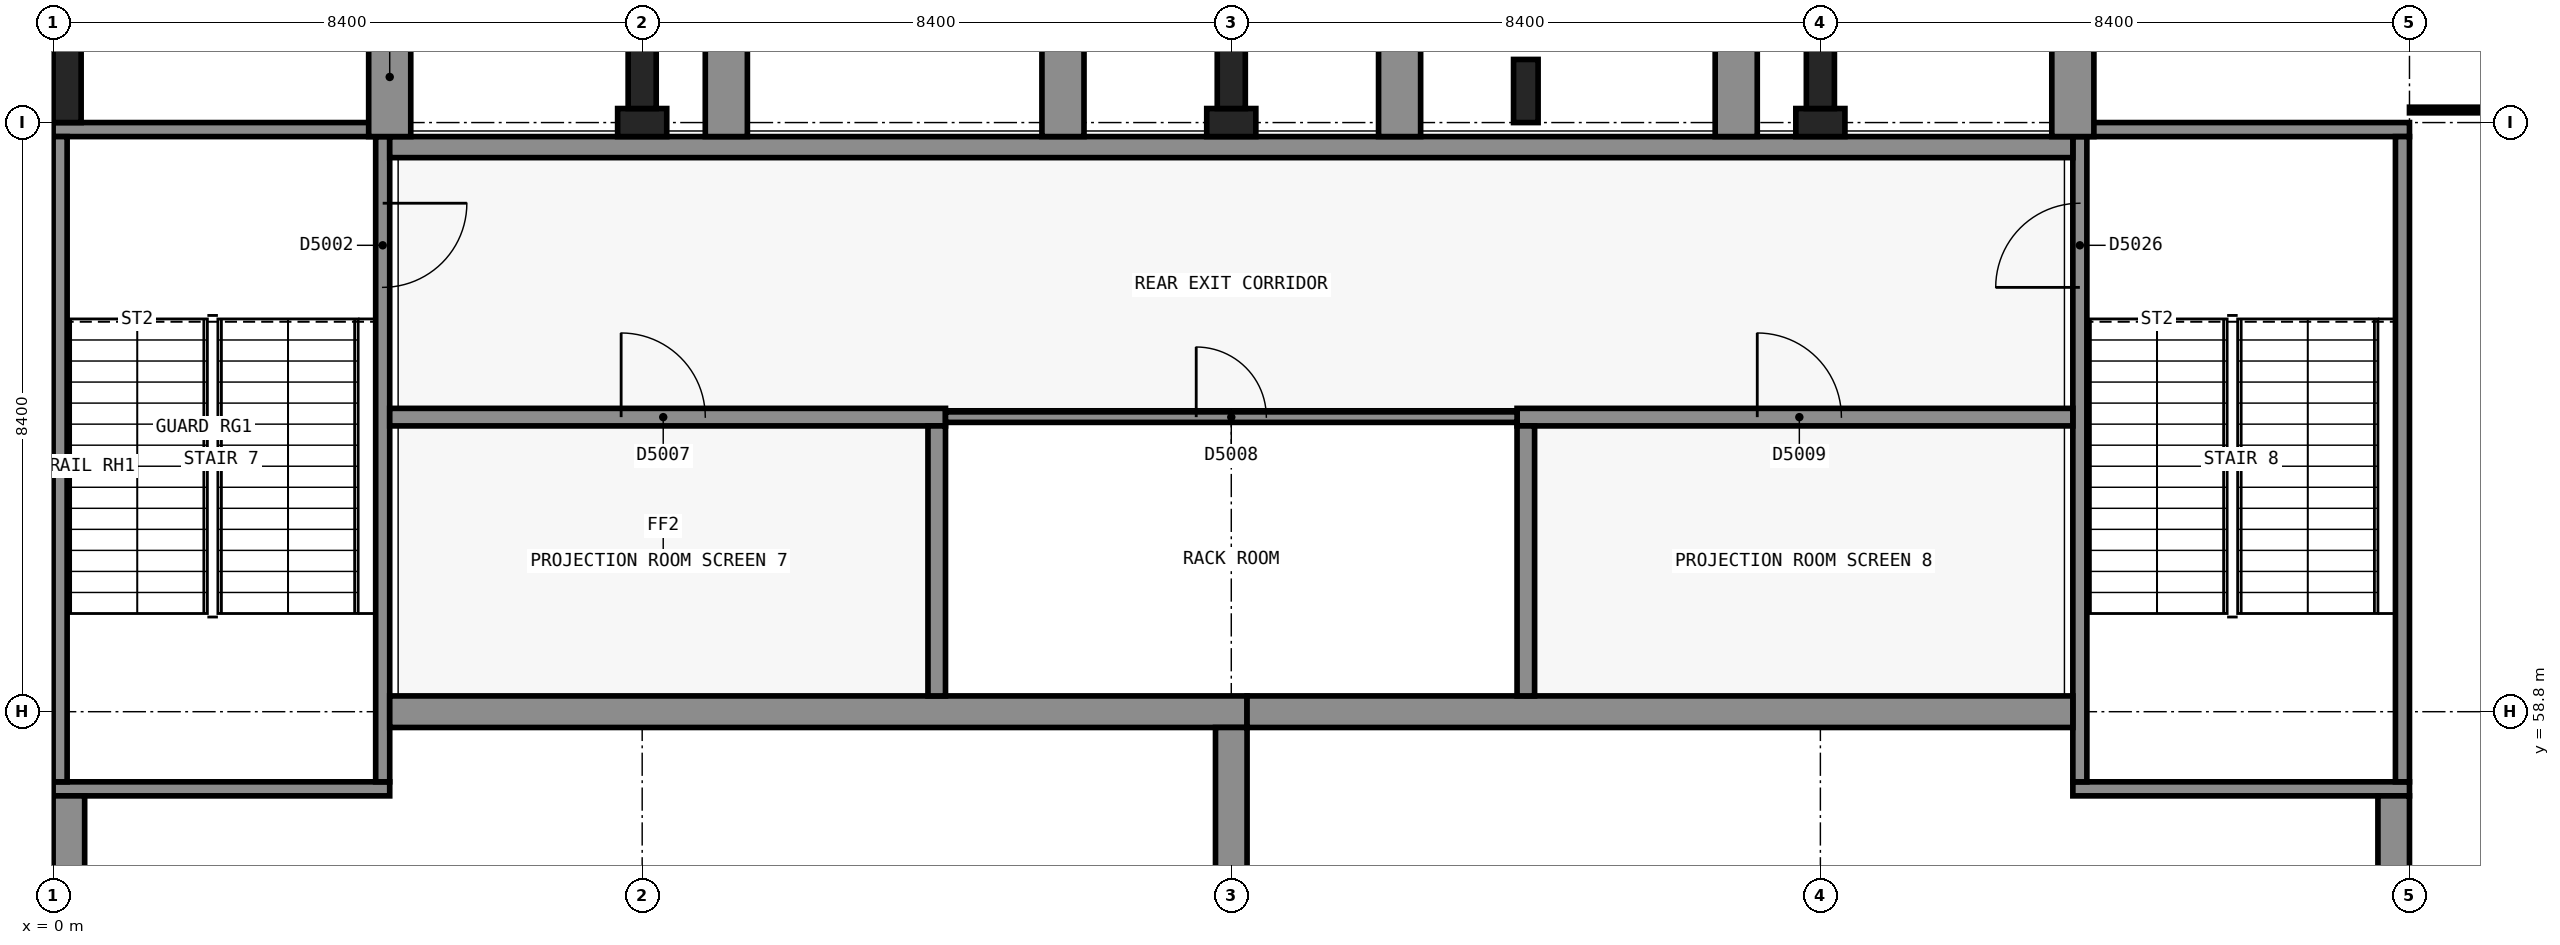
"""IFC4 building model, lengths in metres.
Left out: names, types, materials, properties, quantities, classifications, styles, units other than length and angle.
Written with IfcOpenShell. Run it as: python <this file> out.ifc"""

import sys

from ifc_helpers import new_model, si_unit, direction, frame, frame_2d, origin, origin_2d, place, context, subcontext, project, spatial, polyline, rectangle, outline, extrude, element, fill, save


model = new_model("IFC4")
c1 = context("Model", 3, precision=1e-05, world=origin(), true_north=direction((0.0, 1.0)))
c2 = subcontext(c1, "Body", "Model", "MODEL_VIEW")
j1 = project(units=[si_unit("LENGTHUNIT", "METRE"), si_unit("PLANEANGLEUNIT", "RADIAN")], contexts=[c1])
p1 = place(None, origin())
s1 = spatial("IfcSite", under=j1, at=p1, CompositionType="ELEMENT")
p2 = place(p1, origin())
s2 = spatial("IfcBuilding", under=s1, at=p2, CompositionType="ELEMENT")
p3 = place(p2, frame((0.0, 0.0, 24.6)))
s3 = spatial("IfcBuildingStorey", under=s2, at=p3, CompositionType="ELEMENT", Elevation=24.6)
for number, where, z_axis, x_axis in (
    (1, (4.8, 57.7, 0.0), (0.0, 0.0, 1.0), (-1.0, 0.0, 0.0)),
    (2, (0.0, 67.1, 0.0), (0.0, 0.0, 1.0), (1.0, 0.0, 0.0)),
):
    element("IfcWall", number, at=place(p3, frame(where, z_axis=z_axis, x_axis=x_axis)), inside=s3, PredefinedType="SHEAR", context=c2, shape_type="SweptSolid", body=[
        extrude(rectangle(XDim=4.8, YDim=0.2, at=frame_2d((2.4, 0.0))), origin(), (0.0, 0.0, 1.0), 4.5),
    ])
p4 = place(p3, frame((0.1, 57.8, 0.0), z_axis=(0.0, 0.0, 1.0), x_axis=(0.0, 1.0, 0.0)))
e3 = element("IfcWall", 3, at=p4, inside=s3, PredefinedType="SHEAR", context=c2, shape_type="SweptSolid", body=[
    extrude(rectangle(XDim=9.2, YDim=0.2, at=frame_2d((4.6, 0.0))), origin(), (0.0, 0.0, 1.0), 4.5),
])
p5 = place(p3, frame((4.7, 67.0, 0.0), z_axis=(0.0, 0.0, 1.0), x_axis=(0.0, -1.0, 0.0)))
e4 = element("IfcWall", 4, at=p5, inside=s3, PredefinedType="SHEAR", context=c2, shape_type="SweptSolid", body=[
    extrude(rectangle(XDim=9.2, YDim=0.2, at=frame_2d((4.6, 0.0))), origin(), (0.0, 0.0, 1.0), 4.5),
])
p6 = place(p5, frame((0.95, 0.0, 0.0)))
e5 = element("IfcOpeningElement", 5, at=p6, cuts=e4, PredefinedType="OPENING", context=c2, shape_type="SweptSolid", body=[
    extrude(rectangle(XDim=1.2, YDim=2.1, at=frame_2d((0.6, 1.05))), frame((0.0, 0.11, 0.0), z_axis=(0.0, -1.0, 0.0), x_axis=(1.0, 0.0, 0.0)), (0.0, 0.0, 1.0), 0.22),
])
for number, where, z_axis, x_axis in (
    (6, (33.6, 57.7, 0.0), (0.0, 0.0, 1.0), (-1.0, 0.0, 0.0)),
    (7, (28.8, 67.1, 0.0), (0.0, 0.0, 1.0), (1.0, 0.0, 0.0)),
):
    element("IfcWall", number, at=place(p3, frame(where, z_axis=z_axis, x_axis=x_axis)), inside=s3, PredefinedType="SHEAR", context=c2, shape_type="SweptSolid", body=[
        extrude(rectangle(XDim=4.8, YDim=0.2, at=frame_2d((2.4, 0.0))), origin(), (0.0, 0.0, 1.0), 4.5),
    ])
p7 = place(p3, frame((28.9, 57.8, 0.0), z_axis=(0.0, 0.0, 1.0), x_axis=(0.0, 1.0, 0.0)))
e8 = element("IfcWall", 8, at=p7, inside=s3, PredefinedType="SHEAR", context=c2, shape_type="SweptSolid", body=[
    extrude(rectangle(XDim=9.2, YDim=0.2, at=frame_2d((4.6, 0.0))), origin(), (0.0, 0.0, 1.0), 4.5),
])
p8 = place(p7, frame((7.05, 0.0, 0.0)))
e9 = element("IfcOpeningElement", 9, at=p8, cuts=e8, PredefinedType="OPENING", context=c2, shape_type="SweptSolid", body=[
    extrude(rectangle(XDim=1.2, YDim=2.1, at=frame_2d((0.6, 1.05))), frame((0.0, 0.11, 0.0), z_axis=(0.0, -1.0, 0.0), x_axis=(1.0, 0.0, 0.0)), (0.0, 0.0, 1.0), 0.22),
])
p9 = place(p3, frame((33.5, 67.0, 0.0), z_axis=(0.0, 0.0, 1.0), x_axis=(0.0, -1.0, 0.0)))
e10 = element("IfcWall", 10, at=p9, inside=s3, PredefinedType="SHEAR", context=c2, shape_type="SweptSolid", body=[
    extrude(rectangle(XDim=9.2, YDim=0.2, at=frame_2d((4.6, 0.0))), origin(), (0.0, 0.0, 1.0), 4.5),
])
p10 = place(p3, frame((4.8, 58.8, 0.0), z_axis=(0.0, 0.0, 1.0), x_axis=(1.0, 0.0, 0.0)))
e11 = element("IfcWall", 11, at=p10, inside=s3, PredefinedType="SHEAR", context=c2, shape_type="SweptSolid", body=[
    extrude(rectangle(XDim=12.225, YDim=0.45, at=frame_2d((6.112, 0.0))), origin(), (0.0, 0.0, 1.0), 4.5),
])
p11 = place(p3, frame((0.225, 43.2, 0.0), z_axis=(0.0, 0.0, 1.0), x_axis=(0.0, 1.0, 0.0)))
e12 = element("IfcWall", 12, at=p11, inside=s3, PredefinedType="SHEAR", context=c2, shape_type="SweptSolid", body=[
    extrude(rectangle(XDim=14.4, YDim=0.45, at=frame_2d((7.2, 0.0))), origin(), (0.0, 0.0, 1.0), 4.5),
])
p12 = place(p3, frame((16.8, 58.575, 0.0), z_axis=(0.0, 0.0, 1.0), x_axis=(0.0, -1.0, 0.0)))
e13 = element("IfcWall", 13, at=p12, inside=s3, PredefinedType="SHEAR", context=c2, shape_type="SweptSolid", body=[
    extrude(rectangle(XDim=16.35, YDim=0.45, at=frame_2d((8.175, 0.0))), origin(), (0.0, 0.0, 1.0), 4.5),
])
p13 = place(p3, frame((17.025, 58.8, 0.0), z_axis=(0.0, 0.0, 1.0), x_axis=(1.0, 0.0, 0.0)))
e14 = element("IfcWall", 14, at=p13, inside=s3, PredefinedType="SHEAR", context=c2, shape_type="SweptSolid", body=[
    extrude(rectangle(XDim=11.775, YDim=0.45, at=frame_2d((5.888, 0.0))), origin(), (0.0, 0.0, 1.0), 4.5),
])
p14 = place(p3, frame((33.375, 57.6, 0.0), z_axis=(0.0, 0.0, 1.0), x_axis=(0.0, -1.0, 0.0)))
e15 = element("IfcWall", 15, at=p14, inside=s3, PredefinedType="SHEAR", context=c2, shape_type="SweptSolid", body=[
    extrude(rectangle(XDim=15.375, YDim=0.45, at=frame_2d((7.688, 0.0))), origin(), (0.0, 0.0, 1.0), 4.5),
])
for number, where, z_axis, x_axis in (
    (16, (8.4, 67.2, 0.0), (0.0, 0.0, 1.0), (1.0, 0.0, 0.0)),
    (17, (16.8, 67.2, 0.0), (0.0, 0.0, 1.0), (1.0, 0.0, 0.0)),
    (18, (25.2, 67.2, 0.0), (0.0, 0.0, 1.0), (1.0, 0.0, 0.0)),
):
    element("IfcColumn", number, at=place(p3, frame(where, z_axis=z_axis, x_axis=x_axis)), inside=s3, PredefinedType="COLUMN", context=c2, shape_type="SweptSolid", body=[
        extrude(rectangle(XDim=0.7, YDim=0.4, at=origin_2d()), origin(), (0.0, 0.0, 1.0), 11.642),
    ])
p15 = place(p3, frame((33.6, 67.379, 0.108), z_axis=(0.0, 0.0, 1.0), x_axis=(1.0, 0.0, 0.0)))
e19 = element("IfcWall", 19, at=p15, inside=s3, PredefinedType="MOVABLE", context=c2, shape_type="SweptSolid", body=[
    extrude(outline(polyline([(0.0, 0.0), (25.2, 0.0), (25.2, 0.05), (12.6, 4.129), (0.0, 0.05), (0.0, 0.0)])), frame((0.0, 0.04, 0.0), z_axis=(0.0, -1.0, 0.0), x_axis=(1.0, 0.0, 0.0)), (0.0, 0.0, 1.0), 0.08),
])
p16 = place(p3, frame((4.8, 66.85, 0.0), z_axis=(0.0, 0.0, 1.0), x_axis=(1.0, 0.0, 0.0)))
e20 = element("IfcWall", 20, at=p16, inside=s3, PredefinedType="SOLIDWALL", context=c2, shape_type="SweptSolid", body=[
    extrude(rectangle(XDim=24.0, YDim=0.3, at=frame_2d((12.0, 0.0))), origin(), (0.0, 0.0, 1.0), 4.5),
])
for number, where, z_axis, x_axis in (
    (21, (0.2, 67.8, 0.0), (0.0, 0.0, 1.0), (1.0, 0.0, 0.0)),
    (22, (8.4, 68.0, 0.0), (0.0, 0.0, 1.0), (1.0, 0.0, 0.0)),
    (23, (16.8, 68.0, 0.0), (0.0, 0.0, 1.0), (1.0, 0.0, 0.0)),
):
    element("IfcColumn", number, at=place(p3, frame(where, z_axis=z_axis, x_axis=x_axis)), inside=s3, PredefinedType="PILASTER", context=c2, shape_type="SweptSolid", body=[
        extrude(rectangle(XDim=0.4, YDim=1.2, at=origin_2d()), origin(), (0.0, 0.0, 1.0), 4.5),
    ])
p17 = place(p3, frame((21.0, 67.65, 0.0), z_axis=(0.0, 0.0, 1.0), x_axis=(1.0, 0.0, 0.0)))
e24 = element("IfcColumn", 24, at=p17, inside=s3, PredefinedType="PILASTER", context=c2, shape_type="SweptSolid", body=[
    extrude(rectangle(XDim=0.35, YDim=0.9, at=origin_2d()), origin(), (0.0, 0.0, 1.0), 4.5),
])
p18 = place(p3, frame((25.2, 68.0, 0.0), z_axis=(0.0, 0.0, 1.0), x_axis=(1.0, 0.0, 0.0)))
e25 = element("IfcColumn", 25, at=p18, inside=s3, PredefinedType="PILASTER", context=c2, shape_type="SweptSolid", body=[
    extrude(rectangle(XDim=0.4, YDim=1.2, at=origin_2d()), origin(), (0.0, 0.0, 1.0), 4.5),
])
for number, where, z_axis, x_axis in (
    (26, (4.8, 67.0, 0.0), (0.0, 0.0, 1.0), (0.0, 1.0, 0.0)),
    (27, (9.6, 67.0, 0.0), (0.0, 0.0, 1.0), (0.0, 1.0, 0.0)),
    (28, (14.4, 67.0, 0.0), (0.0, 0.0, 1.0), (0.0, 1.0, 0.0)),
    (29, (19.2, 67.0, 0.0), (0.0, 0.0, 1.0), (0.0, 1.0, 0.0)),
    (30, (24.0, 67.0, 0.0), (0.0, 0.0, 1.0), (0.0, 1.0, 0.0)),
    (31, (28.8, 67.0, 0.0), (0.0, 0.0, 1.0), (0.0, 1.0, 0.0)),
):
    element("IfcWall", number, at=place(p3, frame(where, z_axis=z_axis, x_axis=x_axis)), inside=s3, PredefinedType="SOLIDWALL", context=c2, shape_type="SweptSolid", body=[
        extrude(rectangle(XDim=1.7, YDim=0.6, at=frame_2d((0.85, 0.0))), origin(), (0.0, 0.0, 1.0), 4.5),
    ])
p19 = place(p3, frame((4.8, 63.0, 0.0), z_axis=(0.0, 0.0, 1.0), x_axis=(1.0, 0.0, 0.0)))
e32 = element("IfcWall", 32, at=p19, inside=s3, PredefinedType="PARTITIONING", context=c2, shape_type="SweptSolid", body=[
    extrude(rectangle(XDim=7.925, YDim=0.25, at=frame_2d((3.962, 0.0))), origin(), (0.0, 0.0, 1.0), 2.9),
])
p20 = place(p19, frame((3.3, 0.0, 0.0)))
e33 = element("IfcOpeningElement", 33, at=p20, cuts=e32, PredefinedType="OPENING", context=c2, shape_type="SweptSolid", body=[
    extrude(rectangle(XDim=1.2, YDim=2.1, at=frame_2d((0.6, 1.05))), frame((0.0, 0.135, 0.0), z_axis=(0.0, -1.0, 0.0), x_axis=(1.0, 0.0, 0.0)), (0.0, 0.0, 1.0), 0.27),
])
p21 = place(p3, frame((20.875, 63.0, 0.0), z_axis=(0.0, 0.0, 1.0), x_axis=(1.0, 0.0, 0.0)))
e34 = element("IfcWall", 34, at=p21, inside=s3, PredefinedType="PARTITIONING", context=c2, shape_type="SweptSolid", body=[
    extrude(rectangle(XDim=7.925, YDim=0.25, at=frame_2d((3.962, 0.0))), origin(), (0.0, 0.0, 1.0), 2.9),
])
p22 = place(p21, frame((3.425, 0.0, 0.0)))
e35 = element("IfcOpeningElement", 35, at=p22, cuts=e34, PredefinedType="OPENING", context=c2, shape_type="SweptSolid", body=[
    extrude(rectangle(XDim=1.2, YDim=2.1, at=frame_2d((0.6, 1.05))), frame((0.0, 0.135, 0.0), z_axis=(0.0, -1.0, 0.0), x_axis=(1.0, 0.0, 0.0)), (0.0, 0.0, 1.0), 0.27),
])
for number, where, z_axis, x_axis in (
    (36, (12.6, 59.025, 0.0), (0.0, 0.0, 1.0), (0.0, 1.0, 0.0)),
    (37, (21.0, 59.025, 0.0), (0.0, 0.0, 1.0), (0.0, 1.0, 0.0)),
):
    element("IfcWall", number, at=place(p3, frame(where, z_axis=z_axis, x_axis=x_axis)), inside=s3, PredefinedType="PARTITIONING", context=c2, shape_type="SweptSolid", body=[
        extrude(rectangle(XDim=3.85, YDim=0.25, at=frame_2d((1.925, 0.0))), origin(), (0.0, 0.0, 1.0), 9.456),
    ])
p23 = place(p3, frame((12.725, 63.0, 0.0), z_axis=(0.0, 0.0, 1.0), x_axis=(1.0, 0.0, 0.0)))
e38 = element("IfcWall", 38, at=p23, inside=s3, PredefinedType="PARTITIONING", context=c2, shape_type="SweptSolid", body=[
    extrude(rectangle(XDim=8.15, YDim=0.15, at=frame_2d((4.075, 0.0))), origin(), (0.0, 0.0, 1.0), 2.9),
])
p24 = place(p23, frame((3.575, 0.0, 0.0)))
e39 = element("IfcOpeningElement", 39, at=p24, cuts=e38, PredefinedType="OPENING", context=c2, shape_type="SweptSolid", body=[
    extrude(rectangle(XDim=1.0, YDim=2.1, at=frame_2d((0.5, 1.05))), frame((0.0, 0.085, 0.0), z_axis=(0.0, -1.0, 0.0), x_axis=(1.0, 0.0, 0.0)), (0.0, 0.0, 1.0), 0.17),
])
p25 = place(p6, origin())
e40 = element("IfcDoor", 40, at=p25, inside=s3, OperationType="SINGLE_SWING_RIGHT", PredefinedType="DOOR", context=c2, shape_type="SweptSolid", body=[
    extrude(rectangle(XDim=1.2, YDim=2.1, at=frame_2d((0.6, 1.05))), frame((0.0, 0.025, 0.0), z_axis=(0.0, -1.0, 0.0), x_axis=(1.0, 0.0, 0.0)), (0.0, 0.0, 1.0), 0.05),
])
fill(e5, e40)
p26 = place(p20, origin())
e41 = element("IfcDoor", 41, at=p26, inside=s3, OperationType="SINGLE_SWING_LEFT", PredefinedType="DOOR", context=c2, shape_type="SweptSolid", body=[
    extrude(rectangle(XDim=1.2, YDim=2.1, at=frame_2d((0.6, 1.05))), frame((0.0, 0.025, 0.0), z_axis=(0.0, -1.0, 0.0), x_axis=(1.0, 0.0, 0.0)), (0.0, 0.0, 1.0), 0.05),
])
fill(e33, e41)
p27 = place(p24, origin())
e42 = element("IfcDoor", 42, at=p27, inside=s3, OperationType="SINGLE_SWING_RIGHT", PredefinedType="DOOR", context=c2, shape_type="SweptSolid", body=[
    extrude(rectangle(XDim=1.0, YDim=2.1, at=frame_2d((0.5, 1.05))), frame((0.0, 0.025, 0.0), z_axis=(0.0, -1.0, 0.0), x_axis=(1.0, 0.0, 0.0)), (0.0, 0.0, 1.0), 0.05),
])
fill(e39, e42)
p28 = place(p22, origin())
e43 = element("IfcDoor", 43, at=p28, inside=s3, OperationType="SINGLE_SWING_LEFT", PredefinedType="DOOR", context=c2, shape_type="SweptSolid", body=[
    extrude(rectangle(XDim=1.2, YDim=2.1, at=frame_2d((0.6, 1.05))), frame((0.0, 0.025, 0.0), z_axis=(0.0, -1.0, 0.0), x_axis=(1.0, 0.0, 0.0)), (0.0, 0.0, 1.0), 0.05),
])
fill(e35, e43)
p29 = place(p8, origin())
e44 = element("IfcDoor", 44, at=p29, inside=s3, OperationType="SINGLE_SWING_RIGHT", PredefinedType="DOOR", context=c2, shape_type="SweptSolid", body=[
    extrude(rectangle(XDim=1.2, YDim=2.1, at=frame_2d((0.6, 1.05))), frame((0.0, 0.025, 0.0), z_axis=(0.0, -1.0, 0.0), x_axis=(1.0, 0.0, 0.0)), (0.0, 0.0, 1.0), 0.05),
])
fill(e9, e44)
save(model, sys.argv[1])
